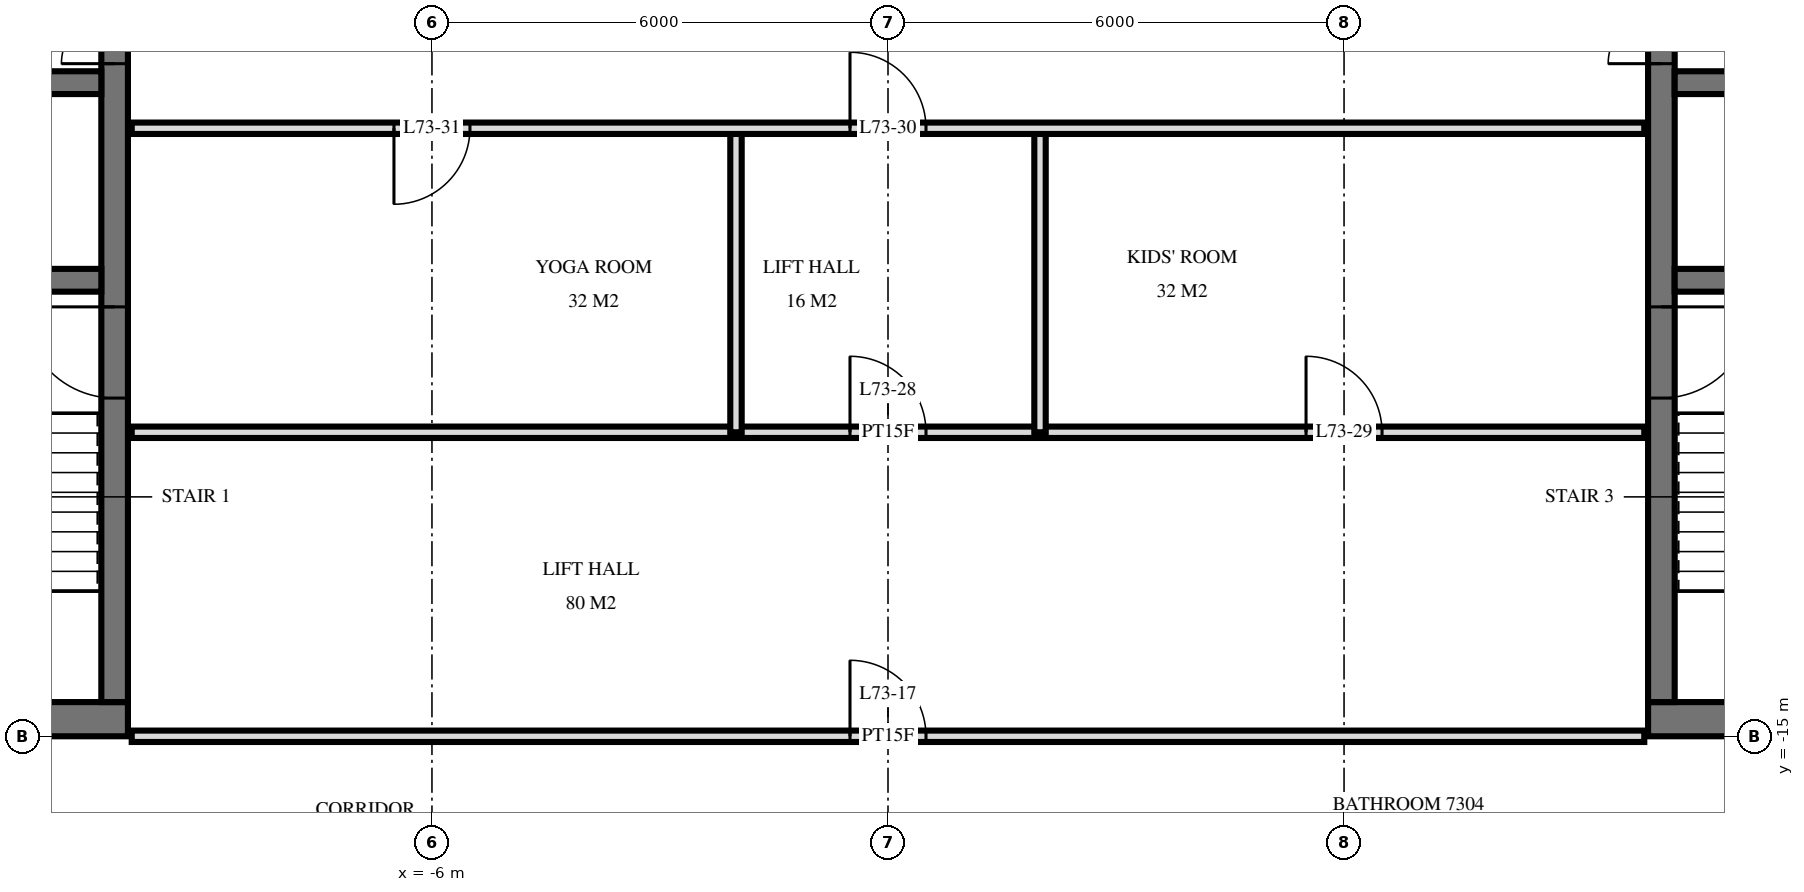
"""IFC4 building model, lengths in metres.
Left out: names, types, materials, properties, quantities, classifications, styles, units other than length and angle.
Written with IfcOpenShell. Run it as: python <this file> out.ifc"""

import sys

from ifc_helpers import new_model, si_unit, direction, frame, frame_2d, origin, place, context, subcontext, project, spatial, rectangle, extrude, element, fill, save


model = new_model("IFC4")
c1 = context("Model", 3, precision=1e-05, world=origin(), true_north=direction((0.0, 1.0)))
c2 = subcontext(c1, "Body", "Model", "MODEL_VIEW")
j1 = project(units=[si_unit("LENGTHUNIT", "METRE"), si_unit("PLANEANGLEUNIT", "RADIAN")], contexts=[c1])
p1 = place(None, origin())
s1 = spatial("IfcSite", under=j1, at=p1, CompositionType="ELEMENT")
p2 = place(p1, origin())
s2 = spatial("IfcBuilding", under=s1, at=p2, CompositionType="ELEMENT")
p3 = place(p2, frame((0.0, 0.0, 277.1)))
s3 = spatial("IfcBuildingStorey", under=s2, at=p3, CompositionType="ELEMENT", Elevation=277.1)
p4 = place(p3, frame((-19.5, -14.775, 0.0), z_axis=(0.0, 0.0, 1.0), x_axis=(1.0, 0.0, 0.0)))
e1 = element("IfcWall", 1, at=p4, inside=s3, PredefinedType="SHEAR", context=c2, shape_type="SweptSolid", body=[
    extrude(rectangle(XDim=9.5, YDim=0.45, at=frame_2d((4.75, 0.0))), origin(), (0.0, 0.0, 1.0), 3.5),
])
p5 = place(p4, frame((1.2, 0.0, 0.0)))
e2 = element("IfcOpeningElement", 2, at=p5, cuts=e1, PredefinedType="OPENING", context=c2, shape_type="SweptSolid", body=[
    extrude(rectangle(XDim=1.2, YDim=2.1, at=frame_2d((0.6, 1.05))), frame((0.0, 0.235, 0.0), z_axis=(0.0, -1.0, 0.0), x_axis=(1.0, 0.0, 0.0)), (0.0, 0.0, 1.0), 0.47),
])
p6 = place(p4, frame((4.25, 0.0, 0.0)))
e3 = element("IfcOpeningElement", 3, at=p6, cuts=e1, PredefinedType="OPENING", context=c2, shape_type="SweptSolid", body=[
    extrude(rectangle(XDim=1.1, YDim=2.1, at=frame_2d((0.55, 1.05))), frame((0.0, 0.235, 0.0), z_axis=(0.0, -1.0, 0.0), x_axis=(1.0, 0.0, 0.0)), (0.0, 0.0, 1.0), 0.47),
])
p7 = place(p3, frame((-10.175, -14.55, 0.0), z_axis=(0.0, 0.0, 1.0), x_axis=(0.0, 1.0, 0.0)))
e4 = element("IfcWall", 4, at=p7, inside=s3, PredefinedType="SHEAR", context=c2, shape_type="SweptSolid", body=[
    extrude(rectangle(XDim=14.1, YDim=0.35, at=frame_2d((7.05, 0.0))), origin(), (0.0, 0.0, 1.0), 3.5),
])
p8 = place(p7, frame((8.4, 0.0, 0.0)))
e5 = element("IfcOpeningElement", 5, at=p8, cuts=e4, PredefinedType="OPENING", context=c2, shape_type="SweptSolid", body=[
    extrude(rectangle(XDim=1.4, YDim=2.4, at=frame_2d((0.7, 1.2))), frame((0.0, 0.185, 0.0), z_axis=(0.0, -1.0, 0.0), x_axis=(1.0, 0.0, 0.0)), (0.0, 0.0, 1.0), 0.37),
])
p9 = place(p7, frame((10.0, 0.0, 0.0)))
e6 = element("IfcOpeningElement", 6, at=p9, cuts=e4, PredefinedType="OPENING", context=c2, shape_type="SweptSolid", body=[
    extrude(rectangle(XDim=1.4, YDim=2.4, at=frame_2d((0.7, 1.2))), frame((0.0, 0.185, 0.0), z_axis=(0.0, -1.0, 0.0), x_axis=(1.0, 0.0, 0.0)), (0.0, 0.0, 1.0), 0.37),
])
p10 = place(p7, frame((4.0, 0.0, 0.0)))
e7 = element("IfcOpeningElement", 7, at=p10, cuts=e4, PredefinedType="OPENING", context=c2, shape_type="SweptSolid", body=[
    extrude(rectangle(XDim=1.2, YDim=2.1, at=frame_2d((0.6, 1.05))), frame((0.0, 0.185, 0.0), z_axis=(0.0, -1.0, 0.0), x_axis=(1.0, 0.0, 0.0)), (0.0, 0.0, 1.0), 0.37),
])
p11 = place(p3, frame((-19.05, -6.4, 0.0), z_axis=(0.0, 0.0, 1.0), x_axis=(1.0, 0.0, 0.0)))
e8 = element("IfcWall", 8, at=p11, inside=s3, PredefinedType="SHEAR", context=c2, shape_type="SweptSolid", body=[
    extrude(rectangle(XDim=8.7, YDim=0.3, at=frame_2d((4.35, 0.0))), origin(), (0.0, 0.0, 1.0), 3.5),
])
p12 = place(p11, frame((0.8, 0.0, 0.0)))
e9 = element("IfcOpeningElement", 9, at=p12, cuts=e8, PredefinedType="OPENING", context=c2, shape_type="SweptSolid", body=[
    extrude(rectangle(XDim=1.1, YDim=2.1, at=frame_2d((0.55, 1.05))), frame((0.0, 0.16, 0.0), z_axis=(0.0, -1.0, 0.0), x_axis=(1.0, 0.0, 0.0)), (0.0, 0.0, 1.0), 0.32),
])
p13 = place(p3, frame((-19.05, -9.0, 0.0), z_axis=(0.0, 0.0, 1.0), x_axis=(1.0, 0.0, 0.0)))
e10 = element("IfcWall", 10, at=p13, inside=s3, PredefinedType="SHEAR", context=c2, shape_type="SweptSolid", body=[
    extrude(rectangle(XDim=8.7, YDim=0.3, at=frame_2d((4.35, 0.0))), origin(), (0.0, 0.0, 1.0), 3.5),
])
p14 = place(p13, frame((3.8, 0.0, 0.0)))
e11 = element("IfcOpeningElement", 11, at=p14, cuts=e10, PredefinedType="OPENING", context=c2, shape_type="SweptSolid", body=[
    extrude(rectangle(XDim=1.1, YDim=2.1, at=frame_2d((0.55, 1.05))), frame((0.0, 0.16, 0.0), z_axis=(0.0, -1.0, 0.0), x_axis=(1.0, 0.0, 0.0)), (0.0, 0.0, 1.0), 0.32),
])
p15 = place(p3, frame((10.0, -14.775, 0.0), z_axis=(0.0, 0.0, 1.0), x_axis=(1.0, 0.0, 0.0)))
e12 = element("IfcWall", 12, at=p15, inside=s3, PredefinedType="SHEAR", context=c2, shape_type="SweptSolid", body=[
    extrude(rectangle(XDim=9.5, YDim=0.45, at=frame_2d((4.75, 0.0))), origin(), (0.0, 0.0, 1.0), 3.5),
])
p16 = place(p15, frame((7.1, 0.0, 0.0)))
e13 = element("IfcOpeningElement", 13, at=p16, cuts=e12, PredefinedType="OPENING", context=c2, shape_type="SweptSolid", body=[
    extrude(rectangle(XDim=1.2, YDim=2.1, at=frame_2d((0.6, 1.05))), frame((0.0, 0.235, 0.0), z_axis=(0.0, -1.0, 0.0), x_axis=(1.0, 0.0, 0.0)), (0.0, 0.0, 1.0), 0.47),
])
p17 = place(p15, frame((4.15, 0.0, 0.0)))
e14 = element("IfcOpeningElement", 14, at=p17, cuts=e12, PredefinedType="OPENING", context=c2, shape_type="SweptSolid", body=[
    extrude(rectangle(XDim=1.1, YDim=2.1, at=frame_2d((0.55, 1.05))), frame((0.0, 0.235, 0.0), z_axis=(0.0, -1.0, 0.0), x_axis=(1.0, 0.0, 0.0)), (0.0, 0.0, 1.0), 0.47),
])
p18 = place(p3, frame((10.175, -14.55, 0.0), z_axis=(0.0, 0.0, 1.0), x_axis=(0.0, 1.0, 0.0)))
e15 = element("IfcWall", 15, at=p18, inside=s3, PredefinedType="SHEAR", context=c2, shape_type="SweptSolid", body=[
    extrude(rectangle(XDim=14.1, YDim=0.35, at=frame_2d((7.05, 0.0))), origin(), (0.0, 0.0, 1.0), 3.5),
])
p19 = place(p18, frame((8.4, 0.0, 0.0)))
e16 = element("IfcOpeningElement", 16, at=p19, cuts=e15, PredefinedType="OPENING", context=c2, shape_type="SweptSolid", body=[
    extrude(rectangle(XDim=1.4, YDim=2.4, at=frame_2d((0.7, 1.2))), frame((0.0, 0.185, 0.0), z_axis=(0.0, -1.0, 0.0), x_axis=(1.0, 0.0, 0.0)), (0.0, 0.0, 1.0), 0.37),
])
p20 = place(p18, frame((10.0, 0.0, 0.0)))
e17 = element("IfcOpeningElement", 17, at=p20, cuts=e15, PredefinedType="OPENING", context=c2, shape_type="SweptSolid", body=[
    extrude(rectangle(XDim=1.4, YDim=2.4, at=frame_2d((0.7, 1.2))), frame((0.0, 0.185, 0.0), z_axis=(0.0, -1.0, 0.0), x_axis=(1.0, 0.0, 0.0)), (0.0, 0.0, 1.0), 0.37),
])
p21 = place(p18, frame((4.0, 0.0, 0.0)))
e18 = element("IfcOpeningElement", 18, at=p21, cuts=e15, PredefinedType="OPENING", context=c2, shape_type="SweptSolid", body=[
    extrude(rectangle(XDim=1.2, YDim=2.1, at=frame_2d((0.6, 1.05))), frame((0.0, 0.185, 0.0), z_axis=(0.0, -1.0, 0.0), x_axis=(1.0, 0.0, 0.0)), (0.0, 0.0, 1.0), 0.37),
])
p22 = place(p3, frame((10.35, -6.4, 0.0), z_axis=(0.0, 0.0, 1.0), x_axis=(1.0, 0.0, 0.0)))
e19 = element("IfcWall", 19, at=p22, inside=s3, PredefinedType="SHEAR", context=c2, shape_type="SweptSolid", body=[
    extrude(rectangle(XDim=8.7, YDim=0.3, at=frame_2d((4.35, 0.0))), origin(), (0.0, 0.0, 1.0), 3.5),
])
p23 = place(p22, frame((6.8, 0.0, 0.0)))
e20 = element("IfcOpeningElement", 20, at=p23, cuts=e19, PredefinedType="OPENING", context=c2, shape_type="SweptSolid", body=[
    extrude(rectangle(XDim=1.1, YDim=2.1, at=frame_2d((0.55, 1.05))), frame((0.0, 0.16, 0.0), z_axis=(0.0, -1.0, 0.0), x_axis=(1.0, 0.0, 0.0)), (0.0, 0.0, 1.0), 0.32),
])
p24 = place(p3, frame((10.35, -9.0, 0.0), z_axis=(0.0, 0.0, 1.0), x_axis=(1.0, 0.0, 0.0)))
e21 = element("IfcWall", 21, at=p24, inside=s3, PredefinedType="SHEAR", context=c2, shape_type="SweptSolid", body=[
    extrude(rectangle(XDim=8.7, YDim=0.3, at=frame_2d((4.35, 0.0))), origin(), (0.0, 0.0, 1.0), 3.5),
])
p25 = place(p24, frame((3.8, 0.0, 0.0)))
e22 = element("IfcOpeningElement", 22, at=p25, cuts=e21, PredefinedType="OPENING", context=c2, shape_type="SweptSolid", body=[
    extrude(rectangle(XDim=1.1, YDim=2.1, at=frame_2d((0.55, 1.05))), frame((0.0, 0.16, 0.0), z_axis=(0.0, -1.0, 0.0), x_axis=(1.0, 0.0, 0.0)), (0.0, 0.0, 1.0), 0.32),
])
for number, where, z_axis, x_axis in (
    (23, (2.0, -11.0, 0.0), (0.0, 0.0, 1.0), (0.0, 1.0, 0.0)),
    (24, (-2.0, -11.0, 0.0), (0.0, 0.0, 1.0), (0.0, 1.0, 0.0)),
):
    element("IfcWall", number, at=place(p3, frame(where, z_axis=z_axis, x_axis=x_axis)), inside=s3, PredefinedType="PARTITIONING", context=c2, shape_type="SweptSolid", body=[
        extrude(rectangle(XDim=4.0, YDim=0.15, at=frame_2d((2.0, 0.0))), origin(), (0.0, 0.0, 1.0), 3.22),
    ])
p26 = place(p3, frame((-9.95, -15.0, 0.0), z_axis=(0.0, 0.0, 1.0), x_axis=(1.0, 0.0, 0.0)))
e25 = element("IfcWall", 25, at=p26, inside=s3, PredefinedType="PARTITIONING", context=c2, shape_type="SweptSolid", body=[
    extrude(rectangle(XDim=19.9, YDim=0.15, at=frame_2d((9.95, 0.0))), origin(), (0.0, 0.0, 1.0), 2.584),
])
p27 = place(p26, frame((9.45, 0.0, 0.0)))
e26 = element("IfcOpeningElement", 26, at=p27, cuts=e25, PredefinedType="OPENING", context=c2, shape_type="SweptSolid", body=[
    extrude(rectangle(XDim=1.0, YDim=2.1, at=frame_2d((0.5, 1.05))), frame((0.0, 0.085, 0.0), z_axis=(0.0, -1.0, 0.0), x_axis=(1.0, 0.0, 0.0)), (0.0, 0.0, 1.0), 0.17),
])
p28 = place(p3, frame((-9.95, -11.0, 0.0), z_axis=(0.0, 0.0, 1.0), x_axis=(1.0, 0.0, 0.0)))
e27 = element("IfcWall", 27, at=p28, inside=s3, PredefinedType="PARTITIONING", context=c2, shape_type="SweptSolid", body=[
    extrude(rectangle(XDim=19.9, YDim=0.15, at=frame_2d((9.95, 0.0))), origin(), (0.0, 0.0, 1.0), 3.22),
])
p29 = place(p28, frame((9.45, 0.0, 0.0)))
e28 = element("IfcOpeningElement", 28, at=p29, cuts=e27, PredefinedType="OPENING", context=c2, shape_type="SweptSolid", body=[
    extrude(rectangle(XDim=1.0, YDim=2.1, at=frame_2d((0.5, 1.05))), frame((0.0, 0.085, 0.0), z_axis=(0.0, -1.0, 0.0), x_axis=(1.0, 0.0, 0.0)), (0.0, 0.0, 1.0), 0.17),
])
p30 = place(p28, frame((15.45, 0.0, 0.0)))
e29 = element("IfcOpeningElement", 29, at=p30, cuts=e27, PredefinedType="OPENING", context=c2, shape_type="SweptSolid", body=[
    extrude(rectangle(XDim=1.0, YDim=2.1, at=frame_2d((0.5, 1.05))), frame((0.0, 0.085, 0.0), z_axis=(0.0, -1.0, 0.0), x_axis=(1.0, 0.0, 0.0)), (0.0, 0.0, 1.0), 0.17),
])
p31 = place(p3, frame((-9.95, -7.0, 0.0), z_axis=(0.0, 0.0, 1.0), x_axis=(1.0, 0.0, 0.0)))
e30 = element("IfcWall", 30, at=p31, inside=s3, PredefinedType="PARTITIONING", context=c2, shape_type="SweptSolid", body=[
    extrude(rectangle(XDim=19.9, YDim=0.15, at=frame_2d((9.95, 0.0))), origin(), (0.0, 0.0, 1.0), 3.22),
])
p32 = place(p31, frame((9.45, 0.0, 0.0)))
e31 = element("IfcOpeningElement", 31, at=p32, cuts=e30, PredefinedType="OPENING", context=c2, shape_type="SweptSolid", body=[
    extrude(rectangle(XDim=1.0, YDim=2.1, at=frame_2d((0.5, 1.05))), frame((0.0, 0.085, 0.0), z_axis=(0.0, -1.0, 0.0), x_axis=(1.0, 0.0, 0.0)), (0.0, 0.0, 1.0), 0.17),
])
p33 = place(p31, frame((3.45, 0.0, 0.0)))
e32 = element("IfcOpeningElement", 32, at=p33, cuts=e30, PredefinedType="OPENING", context=c2, shape_type="SweptSolid", body=[
    extrude(rectangle(XDim=1.0, YDim=2.1, at=frame_2d((0.5, 1.05))), frame((0.0, 0.085, 0.0), z_axis=(0.0, -1.0, 0.0), x_axis=(1.0, 0.0, 0.0)), (0.0, 0.0, 1.0), 0.17),
])
p34 = place(p8, origin())
e33 = element("IfcDoor", 33, at=p34, inside=s3, OperationType="DOUBLE_DOOR_SINGLE_SWING", PredefinedType="DOOR", context=c2, shape_type="SweptSolid", body=[
    extrude(rectangle(XDim=1.4, YDim=2.4, at=frame_2d((0.7, 1.2))), frame((0.0, 0.025, 0.0), z_axis=(0.0, -1.0, 0.0), x_axis=(1.0, 0.0, 0.0)), (0.0, 0.0, 1.0), 0.05),
])
fill(e5, e33)
p35 = place(p10, origin())
e34 = element("IfcDoor", 34, at=p35, inside=s3, OperationType="SINGLE_SWING_LEFT", PredefinedType="DOOR", context=c2, shape_type="SweptSolid", body=[
    extrude(rectangle(XDim=1.2, YDim=2.1, at=frame_2d((0.6, 1.05))), frame((0.0, 0.025, 0.0), z_axis=(0.0, -1.0, 0.0), x_axis=(1.0, 0.0, 0.0)), (0.0, 0.0, 1.0), 0.05),
])
fill(e7, e34)
p36 = place(p19, origin())
e35 = element("IfcDoor", 35, at=p36, inside=s3, OperationType="DOUBLE_DOOR_SINGLE_SWING", PredefinedType="DOOR", context=c2, shape_type="SweptSolid", body=[
    extrude(rectangle(XDim=1.4, YDim=2.4, at=frame_2d((0.7, 1.2))), frame((0.0, 0.025, 0.0), z_axis=(0.0, -1.0, 0.0), x_axis=(1.0, 0.0, 0.0)), (0.0, 0.0, 1.0), 0.05),
])
fill(e16, e35)
p37 = place(p21, frame((0.6, 0.0, 0.0), z_axis=(0.0, 0.0, 1.0), x_axis=(-1.0, 0.0, 0.0)))
e36 = element("IfcDoor", 36, at=p37, inside=s3, OperationType="SINGLE_SWING_RIGHT", PredefinedType="DOOR", context=c2, shape_type="SweptSolid", body=[
    extrude(rectangle(XDim=1.2, YDim=2.1, at=frame_2d((0.0, 1.05))), frame((0.0, -0.025, 0.0), z_axis=(0.0, 1.0, 0.0), x_axis=(-1.0, 0.0, 0.0)), (0.0, 0.0, 1.0), 0.05),
])
fill(e18, e36)
p38 = place(p27, origin())
e37 = element("IfcDoor", 37, at=p38, inside=s3, OperationType="SINGLE_SWING_RIGHT", PredefinedType="DOOR", context=c2, shape_type="SweptSolid", body=[
    extrude(rectangle(XDim=1.0, YDim=2.1, at=frame_2d((0.5, 1.05))), frame((0.0, 0.025, 0.0), z_axis=(0.0, -1.0, 0.0), x_axis=(1.0, 0.0, 0.0)), (0.0, 0.0, 1.0), 0.05),
])
fill(e26, e37)
p39 = place(p29, origin())
e38 = element("IfcDoor", 38, at=p39, inside=s3, OperationType="SINGLE_SWING_RIGHT", PredefinedType="DOOR", context=c2, shape_type="SweptSolid", body=[
    extrude(rectangle(XDim=1.0, YDim=2.1, at=frame_2d((0.5, 1.05))), frame((0.0, 0.025, 0.0), z_axis=(0.0, -1.0, 0.0), x_axis=(1.0, 0.0, 0.0)), (0.0, 0.0, 1.0), 0.05),
])
fill(e28, e38)
p40 = place(p30, origin())
e39 = element("IfcDoor", 39, at=p40, inside=s3, OperationType="SINGLE_SWING_RIGHT", PredefinedType="DOOR", context=c2, shape_type="SweptSolid", body=[
    extrude(rectangle(XDim=1.0, YDim=2.1, at=frame_2d((0.5, 1.05))), frame((0.0, 0.025, 0.0), z_axis=(0.0, -1.0, 0.0), x_axis=(1.0, 0.0, 0.0)), (0.0, 0.0, 1.0), 0.05),
])
fill(e29, e39)
p41 = place(p32, origin())
e40 = element("IfcDoor", 40, at=p41, inside=s3, OperationType="SINGLE_SWING_RIGHT", PredefinedType="DOOR", context=c2, shape_type="SweptSolid", body=[
    extrude(rectangle(XDim=1.0, YDim=2.1, at=frame_2d((0.5, 1.05))), frame((0.0, 0.025, 0.0), z_axis=(0.0, -1.0, 0.0), x_axis=(1.0, 0.0, 0.0)), (0.0, 0.0, 1.0), 0.05),
])
fill(e31, e40)
p42 = place(p33, frame((0.5, 0.0, 0.0), z_axis=(0.0, 0.0, 1.0), x_axis=(-1.0, 0.0, 0.0)))
e41 = element("IfcDoor", 41, at=p42, inside=s3, OperationType="SINGLE_SWING_LEFT", PredefinedType="DOOR", context=c2, shape_type="SweptSolid", body=[
    extrude(rectangle(XDim=1.0, YDim=2.1, at=frame_2d((0.0, 1.05))), frame((0.0, -0.025, 0.0), z_axis=(0.0, 1.0, 0.0), x_axis=(-1.0, 0.0, 0.0)), (0.0, 0.0, 1.0), 0.05),
])
fill(e32, e41)
save(model, sys.argv[1])
